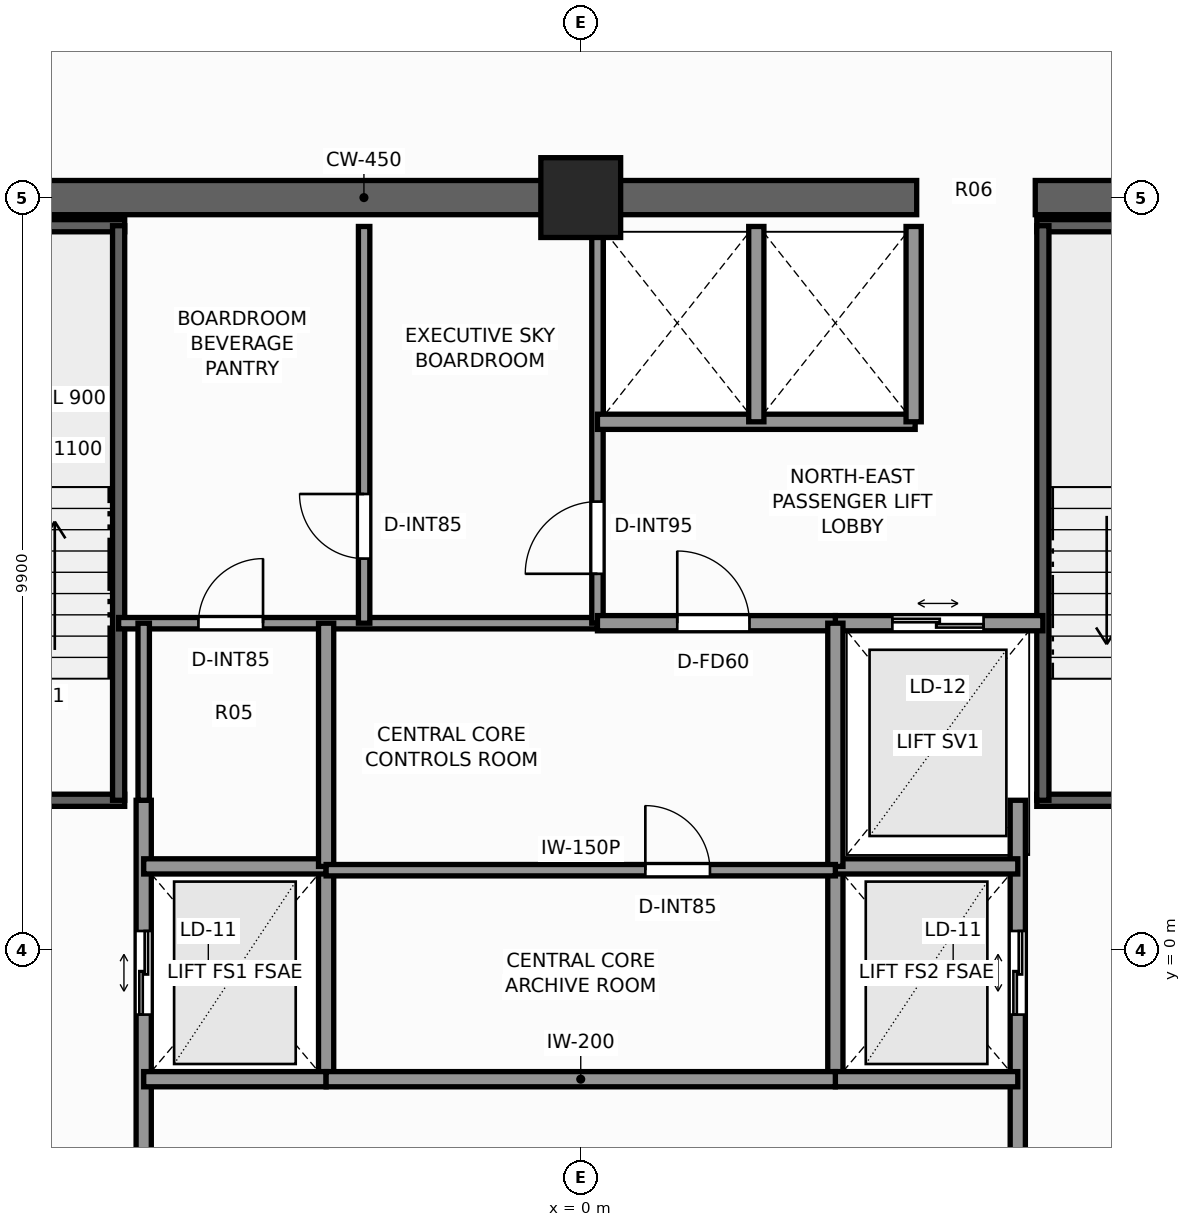
"""IFC4 building model, lengths in metres.
Left out: names, types, materials, properties, quantities, classifications, styles, units other than length and angle.
Written with IfcOpenShell. Run it as: python <this file> out.ifc"""

import sys

from ifc_helpers import new_model, si_unit, direction, frame, frame_2d, origin, origin_2d, place, context, subcontext, project, spatial, rectangle, extrude, element, fill, save


model = new_model("IFC4")
c1 = context("Model", 3, precision=1e-05, world=origin(), true_north=direction((0.0, 1.0)))
c2 = subcontext(c1, "Body", "Model", "MODEL_VIEW")
j1 = project(units=[si_unit("LENGTHUNIT", "METRE"), si_unit("PLANEANGLEUNIT", "RADIAN")], contexts=[c1])
p1 = place(None, origin())
s1 = spatial("IfcSite", under=j1, at=p1, CompositionType="ELEMENT")
p2 = place(p1, origin())
s2 = spatial("IfcBuilding", under=s1, at=p2, CompositionType="ELEMENT")
p3 = place(p2, frame((0.0, 0.0, 251.4)))
s3 = spatial("IfcBuildingStorey", under=s2, at=p3, CompositionType="ELEMENT", Elevation=251.4)
p4 = place(p3, frame((-10.125, 9.9, 0.0), z_axis=(0.0, 0.0, 1.0), x_axis=(1.0, 0.0, 0.0)))
e1 = element("IfcWall", 1, at=p4, inside=s3, PredefinedType="SHEAR", context=c2, shape_type="SweptSolid", body=[
    extrude(rectangle(XDim=14.545, YDim=0.45, at=frame_2d((7.272, 0.0))), origin(), (0.0, 0.0, 1.0), 3.5),
])
p5 = place(p3, frame((5.98, 9.9, 0.0), z_axis=(0.0, 0.0, 1.0), x_axis=(1.0, 0.0, 0.0)))
e2 = element("IfcWall", 2, at=p5, inside=s3, PredefinedType="SHEAR", context=c2, shape_type="SweptSolid", body=[
    extrude(rectangle(XDim=4.145, YDim=0.45, at=frame_2d((2.073, 0.0))), origin(), (0.0, 0.0, 1.0), 3.5),
])
p6 = place(p3, frame((0.0, 9.9, 0.0), z_axis=(0.0, 0.0, 1.0), x_axis=(1.0, 0.0, 0.0)))
e3 = element("IfcColumn", 3, at=p6, inside=s3, PredefinedType="COLUMN", context=c2, shape_type="SweptSolid", body=[
    extrude(rectangle(XDim=1.05, YDim=1.05, at=origin_2d()), origin(), (0.0, 0.0, 1.0), 3.5),
])
p7 = place(p3, frame((-9.52, 1.97, 0.0), z_axis=(0.0, 0.0, 1.0), x_axis=(1.0, 0.0, 0.0)))
e4 = element("IfcWall", 4, at=p7, inside=s3, PredefinedType="SHEAR", context=c2, shape_type="SweptSolid", body=[
    extrude(rectangle(XDim=3.52, YDim=0.16, at=frame_2d((1.76, 0.0))), origin(), (0.0, 0.0, 1.0), 3.5),
])
p8 = place(p7, frame((1.15, 0.0, 0.0)))
e5 = element("IfcOpeningElement", 5, at=p8, cuts=e4, PredefinedType="OPENING", context=c2, shape_type="SweptSolid", body=[
    extrude(rectangle(XDim=1.1, YDim=2.2, at=frame_2d((0.55, 1.1))), frame((0.0, 0.09, 0.0), z_axis=(0.0, -1.0, 0.0), x_axis=(1.0, 0.0, 0.0)), (0.0, 0.0, 1.0), 0.18),
])
p9 = place(p3, frame((-9.52, 9.53, 0.0), z_axis=(0.0, 0.0, 1.0), x_axis=(1.0, 0.0, 0.0)))
e6 = element("IfcWall", 6, at=p9, inside=s3, PredefinedType="SHEAR", context=c2, shape_type="SweptSolid", body=[
    extrude(rectangle(XDim=3.52, YDim=0.16, at=frame_2d((1.76, 0.0))), origin(), (0.0, 0.0, 1.0), 3.5),
])
p10 = place(p3, frame((-6.08, 1.97, 0.0), z_axis=(0.0, 0.0, 1.0), x_axis=(0.0, 1.0, 0.0)))
e7 = element("IfcWall", 7, at=p10, inside=s3, PredefinedType="SHEAR", context=c2, shape_type="SweptSolid", body=[
    extrude(rectangle(XDim=7.56, YDim=0.16, at=frame_2d((3.78, 0.0))), origin(), (0.0, 0.0, 1.0), 3.5),
])
p11 = place(p3, frame((6.0, 1.97, 0.0), z_axis=(0.0, 0.0, 1.0), x_axis=(1.0, 0.0, 0.0)))
e8 = element("IfcWall", 8, at=p11, inside=s3, PredefinedType="SHEAR", context=c2, shape_type="SweptSolid", body=[
    extrude(rectangle(XDim=3.52, YDim=0.16, at=frame_2d((1.76, 0.0))), origin(), (0.0, 0.0, 1.0), 3.5),
])
p12 = place(p11, frame((1.15, 0.0, 0.0)))
e9 = element("IfcOpeningElement", 9, at=p12, cuts=e8, PredefinedType="OPENING", context=c2, shape_type="SweptSolid", body=[
    extrude(rectangle(XDim=1.1, YDim=2.2, at=frame_2d((0.55, 1.1))), frame((0.0, 0.09, 0.0), z_axis=(0.0, -1.0, 0.0), x_axis=(1.0, 0.0, 0.0)), (0.0, 0.0, 1.0), 0.18),
])
p13 = place(p3, frame((6.0, 9.53, 0.0), z_axis=(0.0, 0.0, 1.0), x_axis=(1.0, 0.0, 0.0)))
e10 = element("IfcWall", 10, at=p13, inside=s3, PredefinedType="SHEAR", context=c2, shape_type="SweptSolid", body=[
    extrude(rectangle(XDim=3.52, YDim=0.16, at=frame_2d((1.76, 0.0))), origin(), (0.0, 0.0, 1.0), 3.5),
])
p14 = place(p3, frame((6.08, 1.97, 0.0), z_axis=(0.0, 0.0, 1.0), x_axis=(0.0, 1.0, 0.0)))
e11 = element("IfcWall", 11, at=p14, inside=s3, PredefinedType="SHEAR", context=c2, shape_type="SweptSolid", body=[
    extrude(rectangle(XDim=7.56, YDim=0.16, at=frame_2d((3.78, 0.0))), origin(), (0.0, 0.0, 1.0), 3.5),
])
p15 = place(p3, frame((-5.75, -3.6, 0.0), z_axis=(0.0, 0.0, 1.0), x_axis=(0.0, 1.0, 0.0)))
e12 = element("IfcWall", 12, at=p15, inside=s3, PredefinedType="SOLIDWALL", context=c2, shape_type="SweptSolid", body=[
    extrude(rectangle(XDim=5.57, YDim=0.2, at=frame_2d((2.785, 0.0))), origin(), (0.0, 0.0, 1.0), 3.25),
])
p16 = place(p15, frame((2.75, 0.0, 0.0)))
e13 = element("IfcOpeningElement", 13, at=p16, cuts=e12, PredefinedType="OPENING", context=c2, shape_type="SweptSolid", body=[
    extrude(rectangle(XDim=1.1, YDim=2.2, at=frame_2d((0.55, 1.1))), frame((0.0, 0.11, 0.0), z_axis=(0.0, -1.0, 0.0), x_axis=(1.0, 0.0, 0.0)), (0.0, 0.0, 1.0), 0.22),
])
p17 = place(p3, frame((-3.35, -1.7, 0.0), z_axis=(0.0, 0.0, 1.0), x_axis=(0.0, 1.0, 0.0)))
e14 = element("IfcWall", 14, at=p17, inside=s3, PredefinedType="SOLIDWALL", context=c2, shape_type="SweptSolid", body=[
    extrude(rectangle(XDim=2.8, YDim=0.2, at=frame_2d((1.4, 0.0))), origin(), (0.0, 0.0, 1.0), 3.25),
])
for number, where, z_axis, x_axis in (
    (15, (-5.75, -1.7, 0.0), (0.0, 0.0, 1.0), (1.0, 0.0, 0.0)),
    (16, (-5.75, 1.1, 0.0), (0.0, 0.0, 1.0), (1.0, 0.0, 0.0)),
):
    element("IfcWall", number, at=place(p3, frame(where, z_axis=z_axis, x_axis=x_axis)), inside=s3, PredefinedType="SOLIDWALL", context=c2, shape_type="SweptSolid", body=[
        extrude(rectangle(XDim=2.4, YDim=0.2, at=frame_2d((1.2, 0.0))), origin(), (0.0, 0.0, 1.0), 3.25),
    ])
p18 = place(p3, frame((5.75, -3.6, 0.0), z_axis=(0.0, 0.0, 1.0), x_axis=(0.0, 1.0, 0.0)))
e17 = element("IfcWall", 17, at=p18, inside=s3, PredefinedType="SOLIDWALL", context=c2, shape_type="SweptSolid", body=[
    extrude(rectangle(XDim=5.57, YDim=0.2, at=frame_2d((2.785, 0.0))), origin(), (0.0, 0.0, 1.0), 3.25),
])
p19 = place(p18, frame((2.75, 0.0, 0.0)))
e18 = element("IfcOpeningElement", 18, at=p19, cuts=e17, PredefinedType="OPENING", context=c2, shape_type="SweptSolid", body=[
    extrude(rectangle(XDim=1.1, YDim=2.2, at=frame_2d((0.55, 1.1))), frame((0.0, 0.11, 0.0), z_axis=(0.0, -1.0, 0.0), x_axis=(1.0, 0.0, 0.0)), (0.0, 0.0, 1.0), 0.22),
])
p20 = place(p3, frame((3.35, -1.7, 0.0), z_axis=(0.0, 0.0, 1.0), x_axis=(0.0, 1.0, 0.0)))
e19 = element("IfcWall", 19, at=p20, inside=s3, PredefinedType="SOLIDWALL", context=c2, shape_type="SweptSolid", body=[
    extrude(rectangle(XDim=2.8, YDim=0.2, at=frame_2d((1.4, 0.0))), origin(), (0.0, 0.0, 1.0), 3.25),
])
for number, where, z_axis, x_axis in (
    (20, (3.35, -1.7, 0.0), (0.0, 0.0, 1.0), (1.0, 0.0, 0.0)),
    (21, (3.35, 1.1, 0.0), (0.0, 0.0, 1.0), (1.0, 0.0, 0.0)),
):
    element("IfcWall", number, at=place(p3, frame(where, z_axis=z_axis, x_axis=x_axis)), inside=s3, PredefinedType="SOLIDWALL", context=c2, shape_type="SweptSolid", body=[
        extrude(rectangle(XDim=2.4, YDim=0.2, at=frame_2d((1.2, 0.0))), origin(), (0.0, 0.0, 1.0), 3.25),
    ])
p21 = place(p3, frame((3.35, 4.3, 0.0), z_axis=(0.0, 0.0, 1.0), x_axis=(1.0, 0.0, 0.0)))
e22 = element("IfcWall", 22, at=p21, inside=s3, PredefinedType="SOLIDWALL", context=c2, shape_type="SweptSolid", body=[
    extrude(rectangle(XDim=2.73, YDim=0.2, at=frame_2d((1.365, 0.0))), origin(), (0.0, 0.0, 1.0), 3.25),
])
p22 = place(p21, frame((0.75, 0.0, 0.0)))
e23 = element("IfcOpeningElement", 23, at=p22, cuts=e22, PredefinedType="OPENING", context=c2, shape_type="SweptSolid", body=[
    extrude(rectangle(XDim=1.2, YDim=2.25, at=frame_2d((0.6, 1.125))), frame((0.0, 0.11, 0.0), z_axis=(0.0, -1.0, 0.0), x_axis=(1.0, 0.0, 0.0)), (0.0, 0.0, 1.0), 0.22),
])
p23 = place(p3, frame((-6.08, 4.3, 0.0), z_axis=(0.0, 0.0, 1.0), x_axis=(1.0, 0.0, 0.0)))
e24 = element("IfcWall", 24, at=p23, inside=s3, PredefinedType="PARTITIONING", context=c2, shape_type="SweptSolid", body=[
    extrude(rectangle(XDim=6.3, YDim=0.15, at=frame_2d((3.15, 0.0))), origin(), (0.0, 0.0, 1.0), 3.25),
])
p24 = place(p23, frame((1.05, 0.0, 0.0)))
e25 = element("IfcOpeningElement", 25, at=p24, cuts=e24, PredefinedType="OPENING", context=c2, shape_type="SweptSolid", body=[
    extrude(rectangle(XDim=0.85, YDim=2.03, at=frame_2d((0.425, 1.015))), frame((0.0, 0.085, 0.0), z_axis=(0.0, -1.0, 0.0), x_axis=(1.0, 0.0, 0.0)), (0.0, 0.0, 1.0), 0.17),
])
p25 = place(p3, frame((0.22, 4.3, 0.0), z_axis=(0.0, 0.0, 1.0), x_axis=(0.0, 1.0, 0.0)))
e26 = element("IfcWall", 26, at=p25, inside=s3, PredefinedType="PARTITIONING", context=c2, shape_type="SweptSolid", body=[
    extrude(rectangle(XDim=5.22, YDim=0.15, at=frame_2d((2.61, 0.0))), origin(), (0.0, 0.0, 1.0), 3.25),
])
p26 = place(p25, frame((0.65, 0.0, 0.0)))
e27 = element("IfcOpeningElement", 27, at=p26, cuts=e26, PredefinedType="OPENING", context=c2, shape_type="SweptSolid", body=[
    extrude(rectangle(XDim=0.95, YDim=2.06, at=frame_2d((0.475, 1.03))), frame((0.0, 0.085, 0.0), z_axis=(0.0, -1.0, 0.0), x_axis=(1.0, 0.0, 0.0)), (0.0, 0.0, 1.0), 0.17),
])
p27 = place(p3, frame((-2.85, 4.3, 0.0), z_axis=(0.0, 0.0, 1.0), x_axis=(0.0, 1.0, 0.0)))
e28 = element("IfcWall", 28, at=p27, inside=s3, PredefinedType="PARTITIONING", context=c2, shape_type="SweptSolid", body=[
    extrude(rectangle(XDim=5.22, YDim=0.15, at=frame_2d((2.61, 0.0))), origin(), (0.0, 0.0, 1.0), 3.25),
])
p28 = place(p27, frame((0.85, 0.0, 0.0)))
e29 = element("IfcOpeningElement", 29, at=p28, cuts=e28, PredefinedType="OPENING", context=c2, shape_type="SweptSolid", body=[
    extrude(rectangle(XDim=0.85, YDim=2.03, at=frame_2d((0.425, 1.015))), frame((0.0, 0.085, 0.0), z_axis=(0.0, -1.0, 0.0), x_axis=(1.0, 0.0, 0.0)), (0.0, 0.0, 1.0), 0.17),
])
p29 = place(p3, frame((0.22, 6.95, 0.0), z_axis=(0.0, 0.0, 1.0), x_axis=(1.0, 0.0, 0.0)))
e30 = element("IfcWall", 30, at=p29, inside=s3, PredefinedType="SOLIDWALL", context=c2, shape_type="SweptSolid", body=[
    extrude(rectangle(XDim=4.18, YDim=0.2, at=frame_2d((2.09, 0.0))), origin(), (0.0, 0.0, 1.0), 3.25),
])
for number, where, z_axis, x_axis in (
    (31, (4.38, 6.95, 0.0), (0.0, 0.0, 1.0), (0.0, 1.0, 0.0)),
    (32, (2.31, 6.95, 0.0), (0.0, 0.0, 1.0), (0.0, 1.0, 0.0)),
):
    element("IfcWall", number, at=place(p3, frame(where, z_axis=z_axis, x_axis=x_axis)), inside=s3, PredefinedType="SOLIDWALL", context=c2, shape_type="SweptSolid", body=[
        extrude(rectangle(XDim=2.57, YDim=0.2, at=frame_2d((1.285, 0.0))), origin(), (0.0, 0.0, 1.0), 3.25),
    ])
p30 = place(p3, frame((0.22, 4.3, 0.0), z_axis=(0.0, 0.0, 1.0), x_axis=(1.0, 0.0, 0.0)))
e33 = element("IfcWall", 33, at=p30, inside=s3, PredefinedType="SOLIDWALL", context=c2, shape_type="SweptSolid", body=[
    extrude(rectangle(XDim=3.13, YDim=0.2, at=frame_2d((1.565, 0.0))), origin(), (0.0, 0.0, 1.0), 3.25),
])
p31 = place(p30, frame((1.05, 0.0, 0.0)))
e34 = element("IfcOpeningElement", 34, at=p31, cuts=e33, PredefinedType="OPENING", context=c2, shape_type="SweptSolid", body=[
    extrude(rectangle(XDim=0.95, YDim=2.06, at=frame_2d((0.475, 1.03))), frame((0.0, 0.11, 0.0), z_axis=(0.0, -1.0, 0.0), x_axis=(1.0, 0.0, 0.0)), (0.0, 0.0, 1.0), 0.22),
])
p32 = place(p3, frame((-3.35, -1.7, 0.0), z_axis=(0.0, 0.0, 1.0), x_axis=(1.0, 0.0, 0.0)))
e35 = element("IfcWall", 35, at=p32, inside=s3, PredefinedType="SOLIDWALL", context=c2, shape_type="SweptSolid", body=[
    extrude(rectangle(XDim=6.7, YDim=0.2, at=frame_2d((3.35, 0.0))), origin(), (0.0, 0.0, 1.0), 3.25),
])
for number, where, z_axis, x_axis in (
    (36, (-3.35, 1.1, 0.0), (0.0, 0.0, 1.0), (0.0, 1.0, 0.0)),
    (37, (3.35, 1.1, 0.0), (0.0, 0.0, 1.0), (0.0, 1.0, 0.0)),
):
    element("IfcWall", number, at=place(p3, frame(where, z_axis=z_axis, x_axis=x_axis)), inside=s3, PredefinedType="SOLIDWALL", context=c2, shape_type="SweptSolid", body=[
        extrude(rectangle(XDim=3.2, YDim=0.2, at=frame_2d((1.6, 0.0))), origin(), (0.0, 0.0, 1.0), 3.25),
    ])
p33 = place(p3, frame((-3.35, 1.05, 0.0), z_axis=(0.0, 0.0, 1.0), x_axis=(1.0, 0.0, 0.0)))
e38 = element("IfcWall", 38, at=p33, inside=s3, PredefinedType="PARTITIONING", context=c2, shape_type="SweptSolid", body=[
    extrude(rectangle(XDim=6.7, YDim=0.15, at=frame_2d((3.35, 0.0))), origin(), (0.0, 0.0, 1.0), 3.25),
])
p34 = place(p33, frame((4.2, 0.0, 0.0)))
e39 = element("IfcOpeningElement", 39, at=p34, cuts=e38, PredefinedType="OPENING", context=c2, shape_type="SweptSolid", body=[
    extrude(rectangle(XDim=0.85, YDim=2.03, at=frame_2d((0.425, 1.015))), frame((0.0, 0.085, 0.0), z_axis=(0.0, -1.0, 0.0), x_axis=(1.0, 0.0, 0.0)), (0.0, 0.0, 1.0), 0.17),
])
p35 = place(p3, frame((-5.75, 1.97, 0.0), z_axis=(0.0, 0.0, 1.0), x_axis=(0.0, 1.0, 0.0)))
e40 = element("IfcWall", 40, at=p35, inside=s3, PredefinedType="PARTITIONING", context=c2, shape_type="SweptSolid", body=[
    extrude(rectangle(XDim=2.33, YDim=0.15, at=frame_2d((1.165, 0.0))), origin(), (0.0, 0.0, 1.0), 3.25),
])
p36 = place(p16, origin())
e41 = element("IfcDoor", 41, at=p36, inside=s3, OperationType="DOUBLE_DOOR_SLIDING", PredefinedType="DOOR", context=c2, shape_type="SweptSolid", body=[
    extrude(rectangle(XDim=1.1, YDim=2.2, at=frame_2d((0.55, 1.1))), frame((0.0, 0.025, 0.0), z_axis=(0.0, -1.0, 0.0), x_axis=(1.0, 0.0, 0.0)), (0.0, 0.0, 1.0), 0.05),
])
fill(e13, e41)
p37 = place(p19, origin())
e42 = element("IfcDoor", 42, at=p37, inside=s3, OperationType="DOUBLE_DOOR_SLIDING", PredefinedType="DOOR", context=c2, shape_type="SweptSolid", body=[
    extrude(rectangle(XDim=1.1, YDim=2.2, at=frame_2d((0.55, 1.1))), frame((0.0, 0.025, 0.0), z_axis=(0.0, -1.0, 0.0), x_axis=(1.0, 0.0, 0.0)), (0.0, 0.0, 1.0), 0.05),
])
fill(e18, e42)
p38 = place(p22, origin())
e43 = element("IfcDoor", 43, at=p38, inside=s3, OperationType="DOUBLE_DOOR_SLIDING", PredefinedType="DOOR", context=c2, shape_type="SweptSolid", body=[
    extrude(rectangle(XDim=1.2, YDim=2.25, at=frame_2d((0.6, 1.125))), frame((0.0, 0.025, 0.0), z_axis=(0.0, -1.0, 0.0), x_axis=(1.0, 0.0, 0.0)), (0.0, 0.0, 1.0), 0.05),
])
fill(e23, e43)
p39 = place(p26, origin())
e44 = element("IfcDoor", 44, at=p39, inside=s3, OperationType="SINGLE_SWING_LEFT", PredefinedType="DOOR", context=c2, shape_type="SweptSolid", body=[
    extrude(rectangle(XDim=0.95, YDim=2.06, at=frame_2d((0.475, 1.03))), frame((0.0, 0.025, 0.0), z_axis=(0.0, -1.0, 0.0), x_axis=(1.0, 0.0, 0.0)), (0.0, 0.0, 1.0), 0.05),
])
fill(e27, e44)
p40 = place(p28, origin())
e45 = element("IfcDoor", 45, at=p40, inside=s3, OperationType="SINGLE_SWING_RIGHT", PredefinedType="DOOR", context=c2, shape_type="SweptSolid", body=[
    extrude(rectangle(XDim=0.85, YDim=2.03, at=frame_2d((0.425, 1.015))), frame((0.0, 0.025, 0.0), z_axis=(0.0, -1.0, 0.0), x_axis=(1.0, 0.0, 0.0)), (0.0, 0.0, 1.0), 0.05),
])
fill(e29, e45)
p41 = place(p31, origin())
e46 = element("IfcDoor", 46, at=p41, inside=s3, OperationType="SINGLE_SWING_LEFT", PredefinedType="DOOR", context=c2, shape_type="SweptSolid", body=[
    extrude(rectangle(XDim=0.95, YDim=2.06, at=frame_2d((0.475, 1.03))), frame((0.0, 0.025, 0.0), z_axis=(0.0, -1.0, 0.0), x_axis=(1.0, 0.0, 0.0)), (0.0, 0.0, 1.0), 0.05),
])
fill(e34, e46)
p42 = place(p34, origin())
e47 = element("IfcDoor", 47, at=p42, inside=s3, OperationType="SINGLE_SWING_LEFT", PredefinedType="DOOR", context=c2, shape_type="SweptSolid", body=[
    extrude(rectangle(XDim=0.85, YDim=2.03, at=frame_2d((0.425, 1.015))), frame((0.0, 0.025, 0.0), z_axis=(0.0, -1.0, 0.0), x_axis=(1.0, 0.0, 0.0)), (0.0, 0.0, 1.0), 0.05),
])
fill(e39, e47)
p43 = place(p24, origin())
e48 = element("IfcDoor", 48, at=p43, inside=s3, OperationType="SINGLE_SWING_RIGHT", PredefinedType="DOOR", context=c2, shape_type="SweptSolid", body=[
    extrude(rectangle(XDim=0.85, YDim=2.03, at=frame_2d((0.425, 1.015))), frame((0.0, 0.025, 0.0), z_axis=(0.0, -1.0, 0.0), x_axis=(1.0, 0.0, 0.0)), (0.0, 0.0, 1.0), 0.05),
])
fill(e25, e48)
save(model, sys.argv[1])
